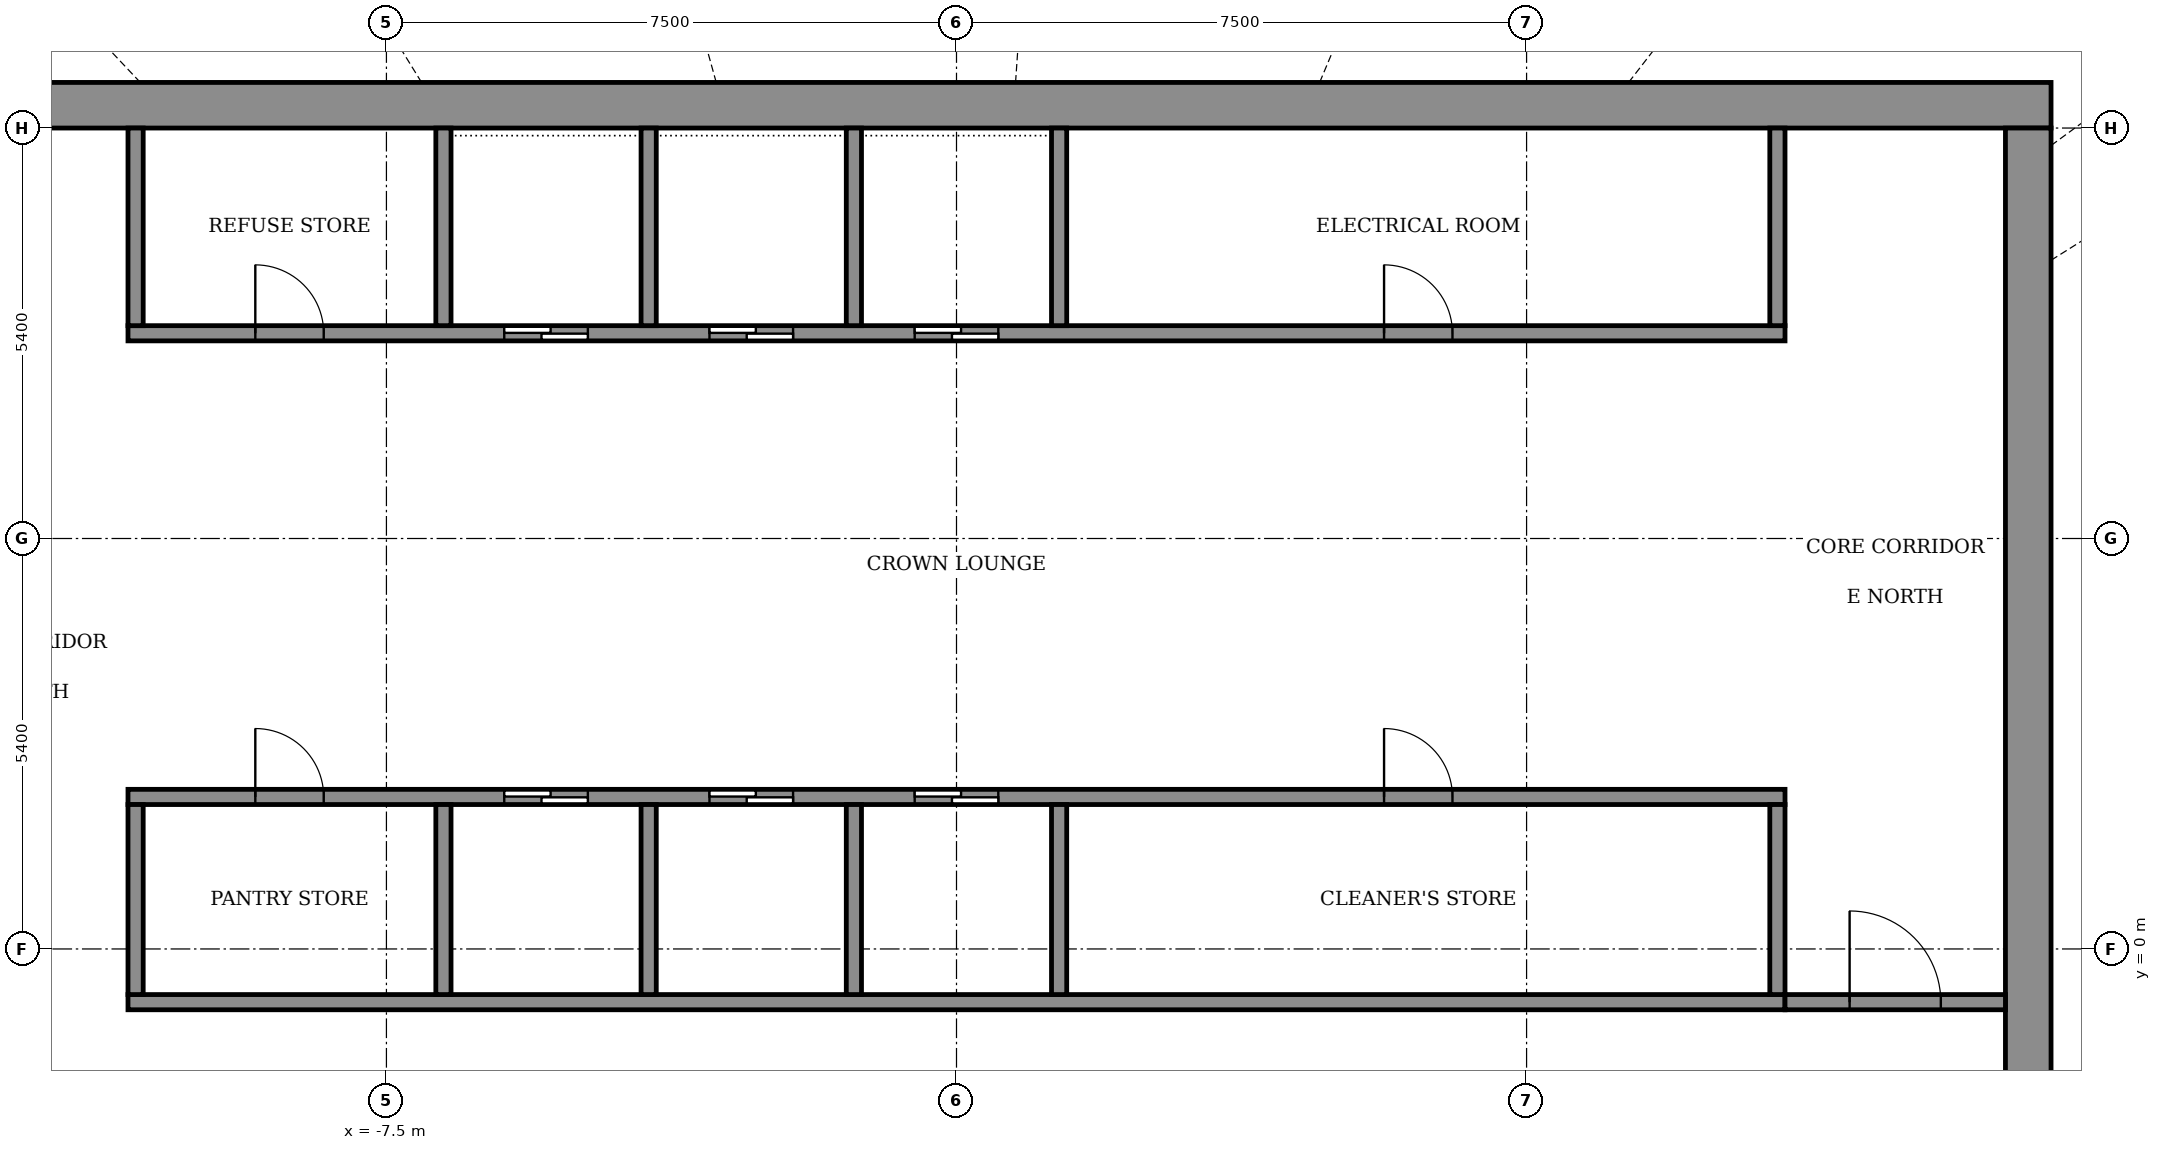
"""IFC4 building model, lengths in metres.
Left out: names, types, materials, properties, quantities, classifications, styles, units other than length and angle.
Written with IfcOpenShell. Run it as: python <this file> out.ifc"""

import sys

from ifc_helpers import new_model, si_unit, direction, frame, frame_2d, origin, place, context, subcontext, project, spatial, rectangle, extrude, element, fill, save


model = new_model("IFC4")
c1 = context("Model", 3, precision=1e-05, world=origin(), true_north=direction((0.0, 1.0)))
c2 = subcontext(c1, "Body", "Model", "MODEL_VIEW")
j1 = project(units=[si_unit("LENGTHUNIT", "METRE"), si_unit("PLANEANGLEUNIT", "RADIAN")], contexts=[c1])
p1 = place(None, origin())
s1 = spatial("IfcSite", under=j1, at=p1, CompositionType="ELEMENT")
p2 = place(p1, origin())
s2 = spatial("IfcBuilding", under=s1, at=p2, CompositionType="ELEMENT")
p3 = place(p2, frame((0.0, 0.0, 337.9)))
s3 = spatial("IfcBuildingStorey", under=s2, at=p3, CompositionType="ELEMENT", Elevation=337.9)
p4 = place(p3, frame((-14.4, 11.1, 0.0), z_axis=(0.0, 0.0, 1.0), x_axis=(1.0, 0.0, 0.0)))
e1 = element("IfcWall", 1, at=p4, inside=s3, PredefinedType="SHEAR", context=c2, shape_type="SweptSolid", body=[
    extrude(rectangle(XDim=28.8, YDim=0.6, at=frame_2d((14.4, 0.0))), origin(), (0.0, 0.0, 1.0), 4.6),
])
p5 = place(p3, frame((14.1, -10.8, 0.0), z_axis=(0.0, 0.0, 1.0), x_axis=(0.0, 1.0, 0.0)))
e2 = element("IfcWall", 2, at=p5, inside=s3, PredefinedType="SHEAR", context=c2, shape_type="SweptSolid", body=[
    extrude(rectangle(XDim=21.6, YDim=0.6, at=frame_2d((10.8, 0.0))), origin(), (0.0, 0.0, 1.0), 4.6),
])
p6 = place(p5, frame((1.2, 0.0, 0.0)))
e3 = element("IfcOpeningElement", 3, at=p6, cuts=e2, PredefinedType="OPENING", context=c2, shape_type="SweptSolid", body=[
    extrude(rectangle(XDim=1.2, YDim=2.1, at=frame_2d((0.6, 1.05))), frame((0.0, 0.31, 0.0), z_axis=(0.0, -1.0, 0.0), x_axis=(1.0, 0.0, 0.0)), (0.0, 0.0, 1.0), 0.62),
])
p7 = place(p3, frame((-10.9, -0.7, 0.0), z_axis=(0.0, 0.0, 1.0), x_axis=(1.0, 0.0, 0.0)))
e4 = element("IfcWall", 4, at=p7, inside=s3, PredefinedType="SHEAR", context=c2, shape_type="SweptSolid", body=[
    extrude(rectangle(XDim=21.8, YDim=0.2, at=frame_2d((10.9, 0.0))), origin(), (0.0, 0.0, 1.0), 4.05),
])
p8 = place(p3, frame((-10.9, 2.0, 0.0), z_axis=(0.0, 0.0, 1.0), x_axis=(1.0, 0.0, 0.0)))
e5 = element("IfcWall", 5, at=p8, inside=s3, PredefinedType="SHEAR", context=c2, shape_type="SweptSolid", body=[
    extrude(rectangle(XDim=21.8, YDim=0.2, at=frame_2d((10.9, 0.0))), origin(), (0.0, 0.0, 1.0), 4.05),
])
p9 = place(p8, frame((4.95, 0.0, 0.0)))
e6 = element("IfcOpeningElement", 6, at=p9, cuts=e5, PredefinedType="OPENING", context=c2, shape_type="SweptSolid", body=[
    extrude(rectangle(XDim=1.1, YDim=2.1, at=frame_2d((0.55, 1.05))), frame((0.0, 0.11, 0.0), z_axis=(0.0, -1.0, 0.0), x_axis=(1.0, 0.0, 0.0)), (0.0, 0.0, 1.0), 0.22),
])
p10 = place(p8, frame((7.65, 0.0, 0.0)))
e7 = element("IfcOpeningElement", 7, at=p10, cuts=e5, PredefinedType="OPENING", context=c2, shape_type="SweptSolid", body=[
    extrude(rectangle(XDim=1.1, YDim=2.1, at=frame_2d((0.55, 1.05))), frame((0.0, 0.11, 0.0), z_axis=(0.0, -1.0, 0.0), x_axis=(1.0, 0.0, 0.0)), (0.0, 0.0, 1.0), 0.22),
])
p11 = place(p8, frame((10.35, 0.0, 0.0)))
e8 = element("IfcOpeningElement", 8, at=p11, cuts=e5, PredefinedType="OPENING", context=c2, shape_type="SweptSolid", body=[
    extrude(rectangle(XDim=1.1, YDim=2.1, at=frame_2d((0.55, 1.05))), frame((0.0, 0.11, 0.0), z_axis=(0.0, -1.0, 0.0), x_axis=(1.0, 0.0, 0.0)), (0.0, 0.0, 1.0), 0.22),
])
p12 = place(p8, frame((1.675, 0.0, 0.0)))
e9 = element("IfcOpeningElement", 9, at=p12, cuts=e5, PredefinedType="OPENING", context=c2, shape_type="SweptSolid", body=[
    extrude(rectangle(XDim=0.9, YDim=2.1, at=frame_2d((0.45, 1.05))), frame((0.0, 0.11, 0.0), z_axis=(0.0, -1.0, 0.0), x_axis=(1.0, 0.0, 0.0)), (0.0, 0.0, 1.0), 0.22),
])
p13 = place(p8, frame((16.525, 0.0, 0.0)))
e10 = element("IfcOpeningElement", 10, at=p13, cuts=e5, PredefinedType="OPENING", context=c2, shape_type="SweptSolid", body=[
    extrude(rectangle(XDim=0.9, YDim=2.1, at=frame_2d((0.45, 1.05))), frame((0.0, 0.11, 0.0), z_axis=(0.0, -1.0, 0.0), x_axis=(1.0, 0.0, 0.0)), (0.0, 0.0, 1.0), 0.22),
])
p14 = place(p3, frame((-10.9, 8.1, 0.0), z_axis=(0.0, 0.0, 1.0), x_axis=(1.0, 0.0, 0.0)))
e11 = element("IfcWall", 11, at=p14, inside=s3, PredefinedType="SHEAR", context=c2, shape_type="SweptSolid", body=[
    extrude(rectangle(XDim=21.8, YDim=0.2, at=frame_2d((10.9, 0.0))), origin(), (0.0, 0.0, 1.0), 4.05),
])
p15 = place(p14, frame((4.95, 0.0, 0.0)))
e12 = element("IfcOpeningElement", 12, at=p15, cuts=e11, PredefinedType="OPENING", context=c2, shape_type="SweptSolid", body=[
    extrude(rectangle(XDim=1.1, YDim=2.1, at=frame_2d((0.55, 1.05))), frame((0.0, 0.11, 0.0), z_axis=(0.0, -1.0, 0.0), x_axis=(1.0, 0.0, 0.0)), (0.0, 0.0, 1.0), 0.22),
])
p16 = place(p14, frame((7.65, 0.0, 0.0)))
e13 = element("IfcOpeningElement", 13, at=p16, cuts=e11, PredefinedType="OPENING", context=c2, shape_type="SweptSolid", body=[
    extrude(rectangle(XDim=1.1, YDim=2.1, at=frame_2d((0.55, 1.05))), frame((0.0, 0.11, 0.0), z_axis=(0.0, -1.0, 0.0), x_axis=(1.0, 0.0, 0.0)), (0.0, 0.0, 1.0), 0.22),
])
p17 = place(p14, frame((10.35, 0.0, 0.0)))
e14 = element("IfcOpeningElement", 14, at=p17, cuts=e11, PredefinedType="OPENING", context=c2, shape_type="SweptSolid", body=[
    extrude(rectangle(XDim=1.1, YDim=2.1, at=frame_2d((0.55, 1.05))), frame((0.0, 0.11, 0.0), z_axis=(0.0, -1.0, 0.0), x_axis=(1.0, 0.0, 0.0)), (0.0, 0.0, 1.0), 0.22),
])
p18 = place(p14, frame((1.675, 0.0, 0.0)))
e15 = element("IfcOpeningElement", 15, at=p18, cuts=e11, PredefinedType="OPENING", context=c2, shape_type="SweptSolid", body=[
    extrude(rectangle(XDim=0.9, YDim=2.1, at=frame_2d((0.45, 1.05))), frame((0.0, 0.11, 0.0), z_axis=(0.0, -1.0, 0.0), x_axis=(1.0, 0.0, 0.0)), (0.0, 0.0, 1.0), 0.22),
])
p19 = place(p14, frame((16.525, 0.0, 0.0)))
e16 = element("IfcOpeningElement", 16, at=p19, cuts=e11, PredefinedType="OPENING", context=c2, shape_type="SweptSolid", body=[
    extrude(rectangle(XDim=0.9, YDim=2.1, at=frame_2d((0.45, 1.05))), frame((0.0, 0.11, 0.0), z_axis=(0.0, -1.0, 0.0), x_axis=(1.0, 0.0, 0.0)), (0.0, 0.0, 1.0), 0.22),
])
p20 = place(p3, frame((-10.8, -0.6, 0.0), z_axis=(0.0, 0.0, 1.0), x_axis=(0.0, 1.0, 0.0)))
e17 = element("IfcWall", 17, at=p20, inside=s3, PredefinedType="STANDARD", context=c2, shape_type="SweptSolid", body=[
    extrude(rectangle(XDim=2.5, YDim=0.2, at=frame_2d((1.25, 0.0))), origin(), (0.0, 0.0, 1.0), 4.05),
])
for number, where, z_axis, x_axis in (
    (18, (-6.75, -0.6, 0.0), (0.0, 0.0, 1.0), (0.0, 1.0, 0.0)),
    (19, (-4.05, -0.6, 0.0), (0.0, 0.0, 1.0), (0.0, 1.0, 0.0)),
    (20, (-1.35, -0.6, 0.0), (0.0, 0.0, 1.0), (0.0, 1.0, 0.0)),
    (21, (1.35, -0.6, 0.0), (0.0, 0.0, 1.0), (0.0, 1.0, 0.0)),
):
    element("IfcWall", number, at=place(p3, frame(where, z_axis=z_axis, x_axis=x_axis)), inside=s3, PredefinedType="SHEAR", context=c2, shape_type="SweptSolid", body=[
        extrude(rectangle(XDim=2.5, YDim=0.2, at=frame_2d((1.25, 0.0))), origin(), (0.0, 0.0, 1.0), 4.05),
    ])
p21 = place(p3, frame((10.8, -0.6, 0.0), z_axis=(0.0, 0.0, 1.0), x_axis=(0.0, 1.0, 0.0)))
e22 = element("IfcWall", 22, at=p21, inside=s3, PredefinedType="STANDARD", context=c2, shape_type="SweptSolid", body=[
    extrude(rectangle(XDim=2.5, YDim=0.2, at=frame_2d((1.25, 0.0))), origin(), (0.0, 0.0, 1.0), 4.05),
])
p22 = place(p3, frame((-10.8, 8.2, 0.0), z_axis=(0.0, 0.0, 1.0), x_axis=(0.0, 1.0, 0.0)))
e23 = element("IfcWall", 23, at=p22, inside=s3, PredefinedType="STANDARD", context=c2, shape_type="SweptSolid", body=[
    extrude(rectangle(XDim=2.6, YDim=0.2, at=frame_2d((1.3, 0.0))), origin(), (0.0, 0.0, 1.0), 4.05),
])
for number, where, z_axis, x_axis in (
    (24, (-6.75, 8.2, 0.0), (0.0, 0.0, 1.0), (0.0, 1.0, 0.0)),
    (25, (-4.05, 8.2, 0.0), (0.0, 0.0, 1.0), (0.0, 1.0, 0.0)),
    (26, (-1.35, 8.2, 0.0), (0.0, 0.0, 1.0), (0.0, 1.0, 0.0)),
    (27, (1.35, 8.2, 0.0), (0.0, 0.0, 1.0), (0.0, 1.0, 0.0)),
):
    element("IfcWall", number, at=place(p3, frame(where, z_axis=z_axis, x_axis=x_axis)), inside=s3, PredefinedType="SHEAR", context=c2, shape_type="SweptSolid", body=[
        extrude(rectangle(XDim=2.6, YDim=0.2, at=frame_2d((1.3, 0.0))), origin(), (0.0, 0.0, 1.0), 4.05),
    ])
p23 = place(p3, frame((10.8, 8.2, 0.0), z_axis=(0.0, 0.0, 1.0), x_axis=(0.0, 1.0, 0.0)))
e28 = element("IfcWall", 28, at=p23, inside=s3, PredefinedType="STANDARD", context=c2, shape_type="SweptSolid", body=[
    extrude(rectangle(XDim=2.6, YDim=0.2, at=frame_2d((1.3, 0.0))), origin(), (0.0, 0.0, 1.0), 4.05),
])
p24 = place(p3, frame((10.9, -0.7, 0.0), z_axis=(0.0, 0.0, 1.0), x_axis=(1.0, 0.0, 0.0)))
e29 = element("IfcWall", 29, at=p24, inside=s3, PredefinedType="STANDARD", context=c2, shape_type="SweptSolid", body=[
    extrude(rectangle(XDim=2.9, YDim=0.2, at=frame_2d((1.45, 0.0))), origin(), (0.0, 0.0, 1.0), 4.05),
])
p25 = place(p24, frame((0.85, 0.0, 0.0)))
e30 = element("IfcOpeningElement", 30, at=p25, cuts=e29, PredefinedType="OPENING", context=c2, shape_type="SweptSolid", body=[
    extrude(rectangle(XDim=1.2, YDim=2.1, at=frame_2d((0.6, 1.05))), frame((0.0, 0.11, 0.0), z_axis=(0.0, -1.0, 0.0), x_axis=(1.0, 0.0, 0.0)), (0.0, 0.0, 1.0), 0.22),
])
p26 = place(p9, origin())
e31 = element("IfcDoor", 31, at=p26, inside=s3, OperationType="SLIDING_TO_LEFT", PredefinedType="DOOR", context=c2, shape_type="SweptSolid", body=[
    extrude(rectangle(XDim=1.1, YDim=2.1, at=frame_2d((0.55, 1.05))), frame((0.0, 0.025, 0.0), z_axis=(0.0, -1.0, 0.0), x_axis=(1.0, 0.0, 0.0)), (0.0, 0.0, 1.0), 0.05),
])
fill(e6, e31)
p27 = place(p10, origin())
e32 = element("IfcDoor", 32, at=p27, inside=s3, OperationType="SLIDING_TO_LEFT", PredefinedType="DOOR", context=c2, shape_type="SweptSolid", body=[
    extrude(rectangle(XDim=1.1, YDim=2.1, at=frame_2d((0.55, 1.05))), frame((0.0, 0.025, 0.0), z_axis=(0.0, -1.0, 0.0), x_axis=(1.0, 0.0, 0.0)), (0.0, 0.0, 1.0), 0.05),
])
fill(e7, e32)
p28 = place(p11, origin())
e33 = element("IfcDoor", 33, at=p28, inside=s3, OperationType="SLIDING_TO_LEFT", PredefinedType="DOOR", context=c2, shape_type="SweptSolid", body=[
    extrude(rectangle(XDim=1.1, YDim=2.1, at=frame_2d((0.55, 1.05))), frame((0.0, 0.025, 0.0), z_axis=(0.0, -1.0, 0.0), x_axis=(1.0, 0.0, 0.0)), (0.0, 0.0, 1.0), 0.05),
])
fill(e8, e33)
p29 = place(p15, origin())
e34 = element("IfcDoor", 34, at=p29, inside=s3, OperationType="SLIDING_TO_LEFT", PredefinedType="DOOR", context=c2, shape_type="SweptSolid", body=[
    extrude(rectangle(XDim=1.1, YDim=2.1, at=frame_2d((0.55, 1.05))), frame((0.0, 0.025, 0.0), z_axis=(0.0, -1.0, 0.0), x_axis=(1.0, 0.0, 0.0)), (0.0, 0.0, 1.0), 0.05),
])
fill(e12, e34)
p30 = place(p16, origin())
e35 = element("IfcDoor", 35, at=p30, inside=s3, OperationType="SLIDING_TO_LEFT", PredefinedType="DOOR", context=c2, shape_type="SweptSolid", body=[
    extrude(rectangle(XDim=1.1, YDim=2.1, at=frame_2d((0.55, 1.05))), frame((0.0, 0.025, 0.0), z_axis=(0.0, -1.0, 0.0), x_axis=(1.0, 0.0, 0.0)), (0.0, 0.0, 1.0), 0.05),
])
fill(e13, e35)
p31 = place(p17, origin())
e36 = element("IfcDoor", 36, at=p31, inside=s3, OperationType="SLIDING_TO_LEFT", PredefinedType="DOOR", context=c2, shape_type="SweptSolid", body=[
    extrude(rectangle(XDim=1.1, YDim=2.1, at=frame_2d((0.55, 1.05))), frame((0.0, 0.025, 0.0), z_axis=(0.0, -1.0, 0.0), x_axis=(1.0, 0.0, 0.0)), (0.0, 0.0, 1.0), 0.05),
])
fill(e14, e36)
p32 = place(p12, origin())
e37 = element("IfcDoor", 37, at=p32, inside=s3, OperationType="SINGLE_SWING_RIGHT", PredefinedType="DOOR", context=c2, shape_type="SweptSolid", body=[
    extrude(rectangle(XDim=0.9, YDim=2.1, at=frame_2d((0.45, 1.05))), frame((0.0, 0.025, 0.0), z_axis=(0.0, -1.0, 0.0), x_axis=(1.0, 0.0, 0.0)), (0.0, 0.0, 1.0), 0.05),
])
fill(e9, e37)
p33 = place(p13, origin())
e38 = element("IfcDoor", 38, at=p33, inside=s3, OperationType="SINGLE_SWING_RIGHT", PredefinedType="DOOR", context=c2, shape_type="SweptSolid", body=[
    extrude(rectangle(XDim=0.9, YDim=2.1, at=frame_2d((0.45, 1.05))), frame((0.0, 0.025, 0.0), z_axis=(0.0, -1.0, 0.0), x_axis=(1.0, 0.0, 0.0)), (0.0, 0.0, 1.0), 0.05),
])
fill(e10, e38)
p34 = place(p18, origin())
e39 = element("IfcDoor", 39, at=p34, inside=s3, OperationType="SINGLE_SWING_RIGHT", PredefinedType="DOOR", context=c2, shape_type="SweptSolid", body=[
    extrude(rectangle(XDim=0.9, YDim=2.1, at=frame_2d((0.45, 1.05))), frame((0.0, 0.025, 0.0), z_axis=(0.0, -1.0, 0.0), x_axis=(1.0, 0.0, 0.0)), (0.0, 0.0, 1.0), 0.05),
])
fill(e15, e39)
p35 = place(p19, origin())
e40 = element("IfcDoor", 40, at=p35, inside=s3, OperationType="SINGLE_SWING_LEFT", PredefinedType="DOOR", context=c2, shape_type="SweptSolid", body=[
    extrude(rectangle(XDim=0.9, YDim=2.1, at=frame_2d((0.45, 1.05))), frame((0.0, 0.025, 0.0), z_axis=(0.0, -1.0, 0.0), x_axis=(1.0, 0.0, 0.0)), (0.0, 0.0, 1.0), 0.05),
])
fill(e16, e40)
p36 = place(p25, origin())
e41 = element("IfcDoor", 41, at=p36, inside=s3, OperationType="SINGLE_SWING_LEFT", PredefinedType="DOOR", context=c2, shape_type="SweptSolid", body=[
    extrude(rectangle(XDim=1.2, YDim=2.1, at=frame_2d((0.6, 1.05))), frame((0.0, 0.025, 0.0), z_axis=(0.0, -1.0, 0.0), x_axis=(1.0, 0.0, 0.0)), (0.0, 0.0, 1.0), 0.05),
])
fill(e30, e41)
save(model, sys.argv[1])
